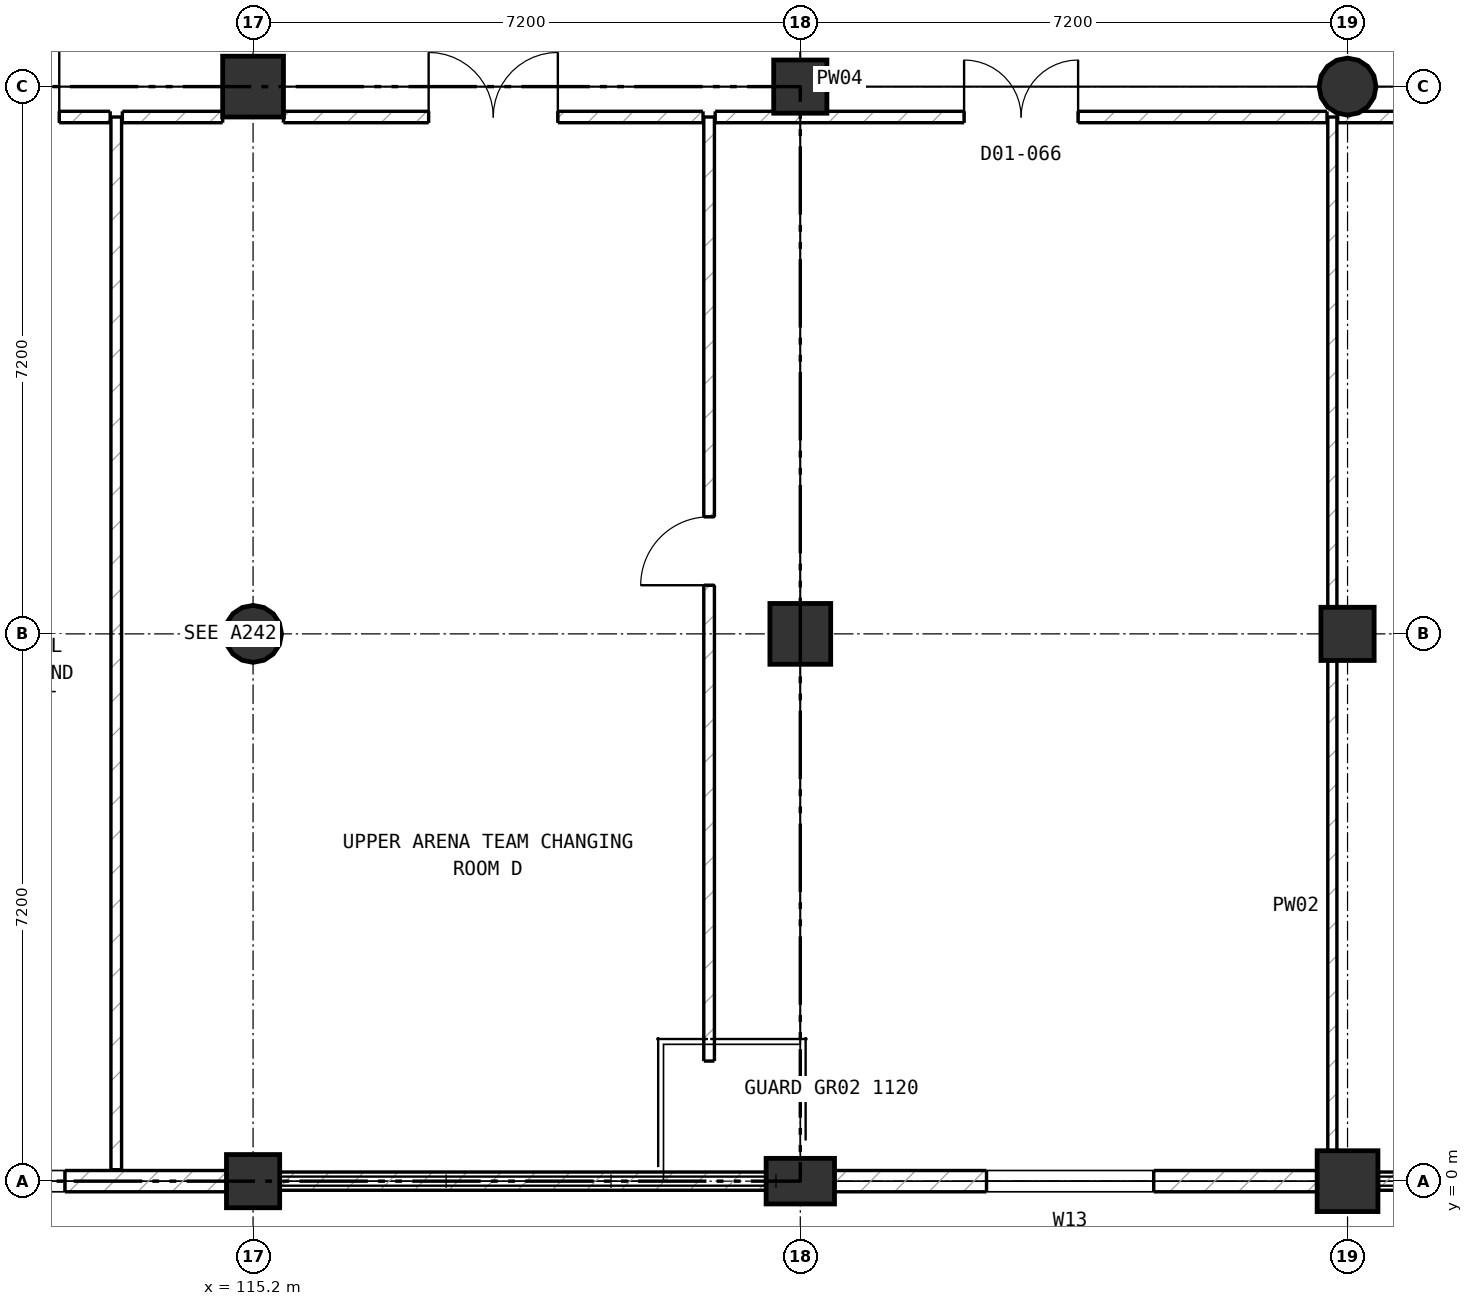
"""IFC4 building model, lengths in metres.
Left out: names, types, materials, properties, quantities, classifications, styles, units other than length and angle.
Written with IfcOpenShell. Run it as: python <this file> out.ifc"""

import sys

from ifc_helpers import new_model, si_unit, direction, frame, frame_2d, origin, origin_2d, place, context, subcontext, project, spatial, rectangle, circle, extrude, element, fill, save


model = new_model("IFC4")
c1 = context("Model", 3, precision=1e-05, world=origin(), true_north=direction((0.0, 1.0)))
c2 = subcontext(c1, "Body", "Model", "MODEL_VIEW")
j1 = project(units=[si_unit("LENGTHUNIT", "METRE"), si_unit("PLANEANGLEUNIT", "RADIAN")], contexts=[c1])
p1 = place(None, origin())
s1 = spatial("IfcSite", under=j1, at=p1, CompositionType="ELEMENT")
p2 = place(p1, origin())
s2 = spatial("IfcBuilding", under=s1, at=p2, CompositionType="ELEMENT")
p3 = place(p2, frame((0.0, 0.0, 5.6)))
s3 = spatial("IfcBuildingStorey", under=s2, at=p3, CompositionType="ELEMENT", Elevation=5.6)
p4 = place(p3, frame((115.2, 0.0, 0.0), z_axis=(0.0, 0.0, 1.0), x_axis=(1.0, 0.0, 0.0)))
e1 = element("IfcColumn", 1, at=p4, inside=s3, PredefinedType="COLUMN", context=c2, shape_type="SweptSolid", body=[
    extrude(rectangle(XDim=0.7, YDim=0.7, at=origin_2d()), origin(), (0.0, 0.0, 1.0), 5.6),
])
p5 = place(p3, frame((115.2, 7.2, 0.0), z_axis=(0.0, 0.0, 1.0), x_axis=(1.0, 0.0, 0.0)))
e2 = element("IfcColumn", 2, at=p5, inside=s3, PredefinedType="COLUMN", context=c2, shape_type="SweptSolid", body=[
    extrude(circle(Radius=0.375, at=origin_2d()), origin(), (0.0, 0.0, 1.0), 5.6),
])
p6 = place(p3, frame((115.2, 14.4, 0.0), z_axis=(0.0, 0.0, 1.0), x_axis=(1.0, 0.0, 0.0)))
e3 = element("IfcColumn", 3, at=p6, inside=s3, PredefinedType="COLUMN", context=c2, shape_type="SweptSolid", body=[
    extrude(rectangle(XDim=0.8, YDim=0.8, at=origin_2d()), origin(), (0.0, 0.0, 1.0), 5.6),
])
p7 = place(p3, frame((122.4, 0.0, 0.0), z_axis=(0.0, 0.0, 1.0), x_axis=(1.0, 0.0, 0.0)))
e4 = element("IfcColumn", 4, at=p7, inside=s3, PredefinedType="COLUMN", context=c2, shape_type="SweptSolid", body=[
    extrude(rectangle(XDim=0.6, YDim=0.9, at=origin_2d()), origin(), (0.0, 0.0, 1.0), 5.6),
])
p8 = place(p3, frame((122.4, 7.2, 0.0), z_axis=(0.0, 0.0, 1.0), x_axis=(1.0, 0.0, 0.0)))
e5 = element("IfcColumn", 5, at=p8, inside=s3, PredefinedType="COLUMN", context=c2, shape_type="SweptSolid", body=[
    extrude(rectangle(XDim=0.8, YDim=0.8, at=origin_2d()), origin(), (0.0, 0.0, 1.0), 5.6),
])
p9 = place(p3, frame((122.4, 14.4, 0.0), z_axis=(0.0, 0.0, 1.0), x_axis=(1.0, 0.0, 0.0)))
e6 = element("IfcColumn", 6, at=p9, inside=s3, PredefinedType="COLUMN", context=c2, shape_type="SweptSolid", body=[
    extrude(rectangle(XDim=0.7, YDim=0.7, at=origin_2d()), origin(), (0.0, 0.0, 1.0), 5.6),
])
p10 = place(p3, frame((129.6, 0.0, 0.0), z_axis=(0.0, 0.0, 1.0), x_axis=(1.0, 0.0, 0.0)))
e7 = element("IfcColumn", 7, at=p10, inside=s3, PredefinedType="COLUMN", context=c2, shape_type="SweptSolid", body=[
    extrude(rectangle(XDim=0.8, YDim=0.8, at=origin_2d()), origin(), (0.0, 0.0, 1.0), 5.6),
])
p11 = place(p3, frame((129.6, 7.2, 0.0), z_axis=(0.0, 0.0, 1.0), x_axis=(1.0, 0.0, 0.0)))
e8 = element("IfcColumn", 8, at=p11, inside=s3, PredefinedType="COLUMN", context=c2, shape_type="SweptSolid", body=[
    extrude(rectangle(XDim=0.7, YDim=0.7, at=origin_2d()), origin(), (0.0, 0.0, 1.0), 5.6),
])
p12 = place(p3, frame((129.6, 14.4, 0.0), z_axis=(0.0, 0.0, 1.0), x_axis=(1.0, 0.0, 0.0)))
e9 = element("IfcColumn", 9, at=p12, inside=s3, PredefinedType="COLUMN", context=c2, shape_type="SweptSolid", body=[
    extrude(circle(Radius=0.375, at=origin_2d()), origin(), (0.0, 0.0, 1.0), 5.6),
])
p13 = place(p3, frame((136.465, 0.0, 0.0), z_axis=(0.0, 0.0, 1.0), x_axis=(-1.0, 0.0, 0.0)))
e10 = element("IfcWall", 10, at=p13, inside=s3, PredefinedType="SOLIDWALL", context=c2, shape_type="SweptSolid", body=[
    extrude(rectangle(XDim=6.48, YDim=0.24, at=frame_2d((3.24, 0.0))), origin(), (0.0, 0.0, 1.0), 0.35),
])
p14 = place(p3, frame((129.215, 0.0, 0.0), z_axis=(0.0, 0.0, 1.0), x_axis=(-1.0, 0.0, 0.0)))
e11 = element("IfcWall", 11, at=p14, inside=s3, PredefinedType="SOLIDWALL", context=c2, shape_type="SweptSolid", body=[
    extrude(rectangle(XDim=6.53, YDim=0.28, at=frame_2d((3.265, 0.0))), origin(), (0.0, 0.0, 1.0), 4.985),
])
p15 = place(p14, frame((2.165, 0.0, 1.0)))
e12 = element("IfcOpeningElement", 12, at=p15, cuts=e11, PredefinedType="OPENING", context=c2, shape_type="SweptSolid", body=[
    extrude(rectangle(XDim=2.2, YDim=1.8, at=frame_2d((1.1, 0.9))), frame((0.0, 0.15, 0.0), z_axis=(0.0, -1.0, 0.0), x_axis=(1.0, 0.0, 0.0)), (0.0, 0.0, 1.0), 0.3),
])
p16 = place(p3, frame((122.115, 0.0, 0.0), z_axis=(0.0, 0.0, 1.0), x_axis=(-1.0, 0.0, 0.0)))
e13 = element("IfcWall", 13, at=p16, inside=s3, PredefinedType="SOLIDWALL", context=c2, shape_type="SweptSolid", body=[
    extrude(rectangle(XDim=6.58, YDim=0.24, at=frame_2d((3.29, 0.0))), origin(), (0.0, 0.0, 1.0), 0.35),
])
p17 = place(p3, frame((114.865, 0.0, 0.0), z_axis=(0.0, 0.0, 1.0), x_axis=(-1.0, 0.0, 0.0)))
e14 = element("IfcWall", 14, at=p17, inside=s3, PredefinedType="SOLIDWALL", context=c2, shape_type="SweptSolid", body=[
    extrude(rectangle(XDim=6.48, YDim=0.28, at=frame_2d((3.24, 0.0))), origin(), (0.0, 0.0, 1.0), 4.985),
])
p18 = place(p17, frame((2.14, 0.0, 1.0)))
e15 = element("IfcOpeningElement", 15, at=p18, cuts=e14, PredefinedType="OPENING", context=c2, shape_type="SweptSolid", body=[
    extrude(rectangle(XDim=2.2, YDim=1.8, at=frame_2d((1.1, 0.9))), frame((0.0, 0.15, 0.0), z_axis=(0.0, -1.0, 0.0), x_axis=(1.0, 0.0, 0.0)), (0.0, 0.0, 1.0), 0.3),
])
p19 = place(p3, frame((113.4, 0.15, 0.0), z_axis=(0.0, 0.0, 1.0), x_axis=(0.0, 1.0, 0.0)))
e16 = element("IfcWall", 16, at=p19, inside=s3, PredefinedType="PARTITIONING", context=c2, shape_type="SweptSolid", body=[
    extrude(rectangle(XDim=13.85, YDim=0.14, at=frame_2d((6.925, 0.0))), origin(), (0.0, 0.0, 1.0), 5.31),
])
p20 = place(p3, frame((129.4, 0.4, 0.0), z_axis=(0.0, 0.0, 1.0), x_axis=(0.0, 1.0, 0.0)))
e17 = element("IfcWall", 17, at=p20, inside=s3, PredefinedType="PARTITIONING", context=c2, shape_type="SweptSolid", body=[
    extrude(rectangle(XDim=6.45, YDim=0.12, at=frame_2d((3.225, 0.0))), origin(), (0.0, 0.0, 1.0), 5.29),
])
p21 = place(p3, frame((129.4, 7.55, 0.0), z_axis=(0.0, 0.0, 1.0), x_axis=(0.0, 1.0, 0.0)))
e18 = element("IfcWall", 18, at=p21, inside=s3, PredefinedType="PARTITIONING", context=c2, shape_type="SweptSolid", body=[
    extrude(rectangle(XDim=6.45, YDim=0.12, at=frame_2d((3.225, 0.0))), origin(), (0.0, 0.0, 1.0), 5.29),
])
p22 = place(p3, frame((121.2, 1.58, 0.0), z_axis=(0.0, 0.0, 1.0), x_axis=(0.0, 1.0, 0.0)))
e19 = element("IfcWall", 19, at=p22, inside=s3, PredefinedType="PARTITIONING", context=c2, shape_type="SweptSolid", body=[
    extrude(rectangle(XDim=12.42, YDim=0.14, at=frame_2d((6.21, 0.0))), origin(), (0.0, 0.0, 1.0), 5.29),
])
p23 = place(p22, frame((6.26, 0.0, 0.0)))
e20 = element("IfcOpeningElement", 20, at=p23, cuts=e19, PredefinedType="OPENING", context=c2, shape_type="SweptSolid", body=[
    extrude(rectangle(XDim=0.9, YDim=2.1, at=frame_2d((0.45, 1.05))), frame((0.0, 0.08, 0.0), z_axis=(0.0, -1.0, 0.0), x_axis=(1.0, 0.0, 0.0)), (0.0, 0.0, 1.0), 0.16),
])
p24 = place(p3, frame((110.98, 14.0, 0.0), z_axis=(0.0, 0.0, 1.0), x_axis=(1.0, 0.0, 0.0)))
e21 = element("IfcWall", 21, at=p24, inside=s3, PredefinedType="PARTITIONING", context=c2, shape_type="SweptSolid", body=[
    extrude(rectangle(XDim=2.34, YDim=0.15, at=frame_2d((1.17, 0.0))), origin(), (0.0, 0.0, 1.0), 5.31),
])
p25 = place(p24, frame((0.67, 0.0, 0.0)))
e22 = element("IfcOpeningElement", 22, at=p25, cuts=e21, PredefinedType="OPENING", context=c2, shape_type="SweptSolid", body=[
    extrude(rectangle(XDim=1.0, YDim=2.15, at=frame_2d((0.5, 1.075))), frame((0.0, 0.085, 0.0), z_axis=(0.0, -1.0, 0.0), x_axis=(1.0, 0.0, 0.0)), (0.0, 0.0, 1.0), 0.17),
])
p26 = place(p3, frame((113.48, 14.0, 0.0), z_axis=(0.0, 0.0, 1.0), x_axis=(1.0, 0.0, 0.0)))
e23 = element("IfcWall", 23, at=p26, inside=s3, PredefinedType="PARTITIONING", context=c2, shape_type="SweptSolid", body=[
    extrude(rectangle(XDim=1.32, YDim=0.15, at=frame_2d((0.66, 0.0))), origin(), (0.0, 0.0, 1.0), 5.31),
])
p27 = place(p3, frame((115.6, 14.0, 0.0), z_axis=(0.0, 0.0, 1.0), x_axis=(1.0, 0.0, 0.0)))
e24 = element("IfcWall", 24, at=p27, inside=s3, PredefinedType="PARTITIONING", context=c2, shape_type="SweptSolid", body=[
    extrude(rectangle(XDim=5.52, YDim=0.15, at=frame_2d((2.76, 0.0))), origin(), (0.0, 0.0, 1.0), 5.29),
])
p28 = place(p27, frame((1.91, 0.0, 0.0)))
e25 = element("IfcOpeningElement", 25, at=p28, cuts=e24, PredefinedType="OPENING", context=c2, shape_type="SweptSolid", body=[
    extrude(rectangle(XDim=1.7, YDim=2.3, at=frame_2d((0.85, 1.15))), frame((0.0, 0.085, 0.0), z_axis=(0.0, -1.0, 0.0), x_axis=(1.0, 0.0, 0.0)), (0.0, 0.0, 1.0), 0.17),
])
p29 = place(p3, frame((121.28, 14.0, 0.0), z_axis=(0.0, 0.0, 1.0), x_axis=(1.0, 0.0, 0.0)))
e26 = element("IfcWall", 26, at=p29, inside=s3, PredefinedType="PARTITIONING", context=c2, shape_type="SweptSolid", body=[
    extrude(rectangle(XDim=8.05, YDim=0.15, at=frame_2d((4.025, 0.0))), origin(), (0.0, 0.0, 1.0), 5.29),
])
p30 = place(p29, frame((3.275, 0.0, 0.0)))
e27 = element("IfcOpeningElement", 27, at=p30, cuts=e26, PredefinedType="OPENING", context=c2, shape_type="SweptSolid", body=[
    extrude(rectangle(XDim=1.5, YDim=2.2, at=frame_2d((0.75, 1.1))), frame((0.0, 0.085, 0.0), z_axis=(0.0, -1.0, 0.0), x_axis=(1.0, 0.0, 0.0)), (0.0, 0.0, 1.0), 0.17),
])
p31 = place(p3, frame((129.47, 14.0, 0.0), z_axis=(0.0, 0.0, 1.0), x_axis=(1.0, 0.0, 0.0)))
e28 = element("IfcWall", 28, at=p31, inside=s3, PredefinedType="PARTITIONING", context=c2, shape_type="SweptSolid", body=[
    extrude(rectangle(XDim=6.93, YDim=0.15, at=frame_2d((3.465, 0.0))), origin(), (0.0, 0.0, 1.0), 5.29),
])
p32 = place(p31, frame((2.715, 0.0, 0.0)))
e29 = element("IfcOpeningElement", 29, at=p32, cuts=e28, PredefinedType="OPENING", context=c2, shape_type="SweptSolid", body=[
    extrude(rectangle(XDim=1.5, YDim=2.2, at=frame_2d((0.75, 1.1))), frame((0.0, 0.085, 0.0), z_axis=(0.0, -1.0, 0.0), x_axis=(1.0, 0.0, 0.0)), (0.0, 0.0, 1.0), 0.17),
])
p33 = place(p15, origin())
e30 = element("IfcWindow", 30, at=p33, inside=s3, PartitioningType="SINGLE_PANEL", PredefinedType="WINDOW", context=c2, shape_type="SweptSolid", body=[
    extrude(rectangle(XDim=2.2, YDim=1.8, at=frame_2d((1.1, 0.9))), frame((0.0, 0.03, 0.0), z_axis=(0.0, -1.0, 0.0), x_axis=(1.0, 0.0, 0.0)), (0.0, 0.0, 1.0), 0.06),
])
fill(e12, e30)
p34 = place(p18, origin())
e31 = element("IfcWindow", 31, at=p34, inside=s3, PartitioningType="SINGLE_PANEL", PredefinedType="WINDOW", context=c2, shape_type="SweptSolid", body=[
    extrude(rectangle(XDim=2.2, YDim=1.8, at=frame_2d((1.1, 0.9))), frame((0.0, 0.03, 0.0), z_axis=(0.0, -1.0, 0.0), x_axis=(1.0, 0.0, 0.0)), (0.0, 0.0, 1.0), 0.06),
])
fill(e15, e31)
p35 = place(p23, origin())
e32 = element("IfcDoor", 32, at=p35, inside=s3, OperationType="SINGLE_SWING_LEFT", PredefinedType="DOOR", context=c2, shape_type="SweptSolid", body=[
    extrude(rectangle(XDim=0.9, YDim=2.1, at=frame_2d((0.45, 1.05))), frame((0.0, 0.025, 0.0), z_axis=(0.0, -1.0, 0.0), x_axis=(1.0, 0.0, 0.0)), (0.0, 0.0, 1.0), 0.05),
])
fill(e20, e32)
p36 = place(p25, origin())
e33 = element("IfcDoor", 33, at=p36, inside=s3, OperationType="SINGLE_SWING_RIGHT", PredefinedType="DOOR", context=c2, shape_type="SweptSolid", body=[
    extrude(rectangle(XDim=1.0, YDim=2.15, at=frame_2d((0.5, 1.075))), frame((0.0, 0.025, 0.0), z_axis=(0.0, -1.0, 0.0), x_axis=(1.0, 0.0, 0.0)), (0.0, 0.0, 1.0), 0.05),
])
fill(e22, e33)
p37 = place(p28, origin())
e34 = element("IfcDoor", 34, at=p37, inside=s3, OperationType="DOUBLE_DOOR_SINGLE_SWING", PredefinedType="DOOR", context=c2, shape_type="SweptSolid", body=[
    extrude(rectangle(XDim=1.7, YDim=2.3, at=frame_2d((0.85, 1.15))), frame((0.0, 0.025, 0.0), z_axis=(0.0, -1.0, 0.0), x_axis=(1.0, 0.0, 0.0)), (0.0, 0.0, 1.0), 0.05),
])
fill(e25, e34)
p38 = place(p30, origin())
e35 = element("IfcDoor", 35, at=p38, inside=s3, OperationType="DOUBLE_DOOR_SINGLE_SWING", PredefinedType="DOOR", context=c2, shape_type="SweptSolid", body=[
    extrude(rectangle(XDim=1.5, YDim=2.2, at=frame_2d((0.75, 1.1))), frame((0.0, 0.025, 0.0), z_axis=(0.0, -1.0, 0.0), x_axis=(1.0, 0.0, 0.0)), (0.0, 0.0, 1.0), 0.05),
])
fill(e27, e35)
save(model, sys.argv[1])
